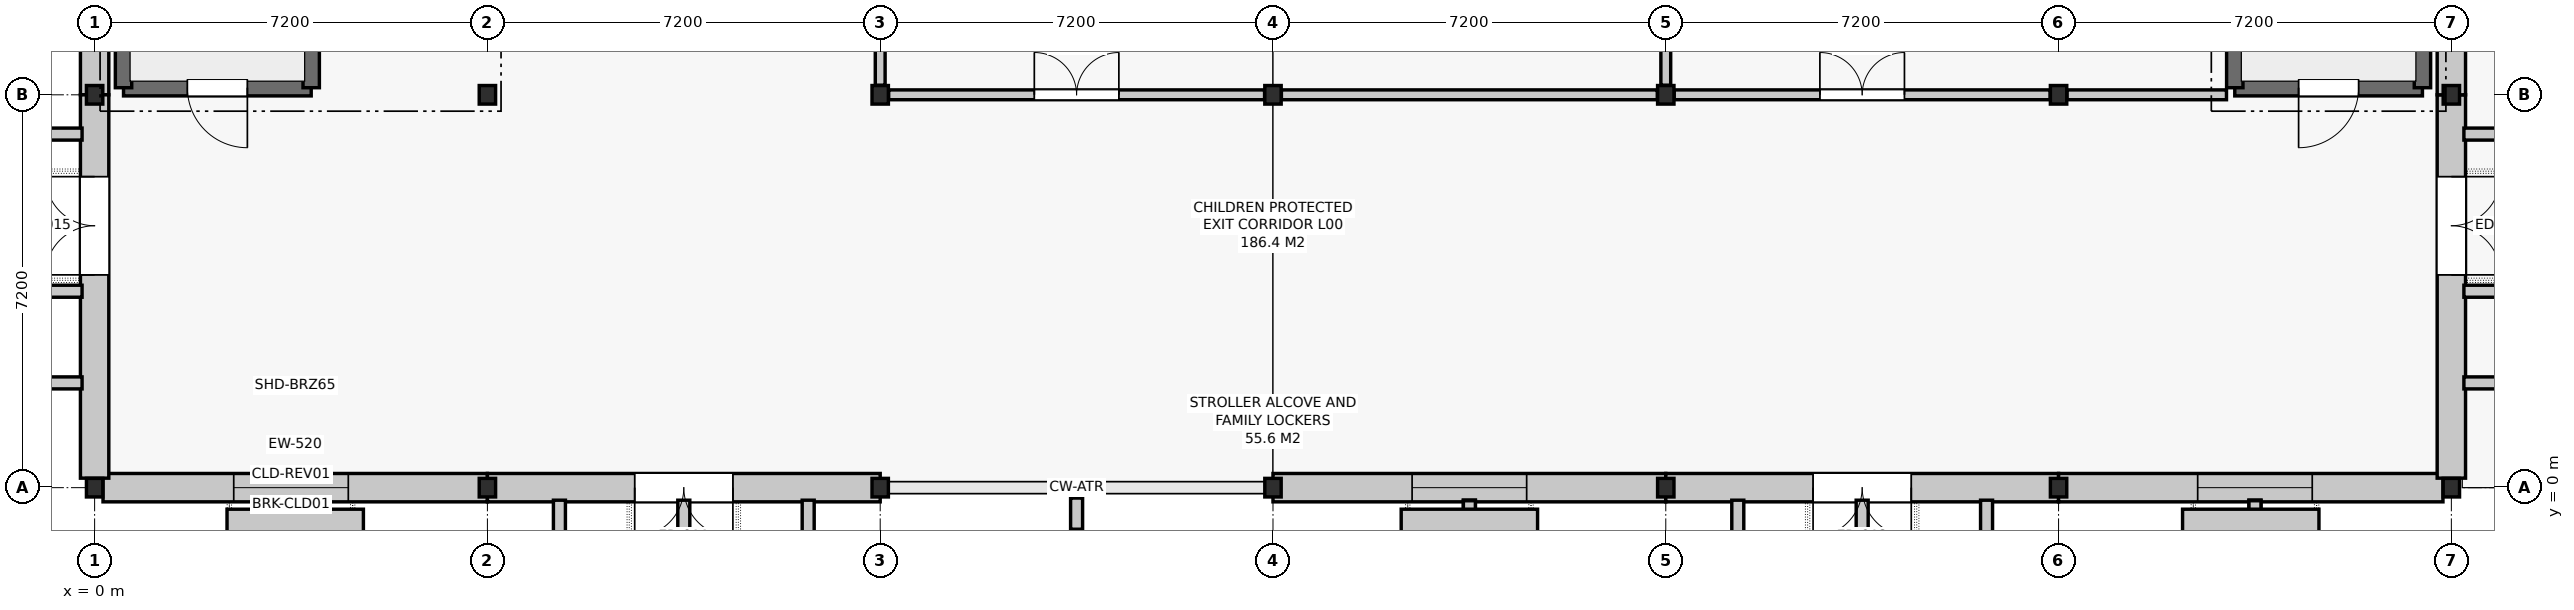
"""IFC4 building model, lengths in metres.
Left out: names, types, materials, properties, quantities, classifications, styles, units other than length and angle.
Written with IfcOpenShell. Run it as: python <this file> out.ifc"""

import sys

from ifc_helpers import new_model, si_unit, direction, frame, frame_2d, origin, origin_2d, place, context, subcontext, project, spatial, rectangle, i_section, extrude, element, fill, save


model = new_model("IFC4")
c1 = context("Model", 3, precision=1e-05, world=origin(), true_north=direction((0.0, 1.0)))
c2 = subcontext(c1, "Body", "Model", "MODEL_VIEW")
j1 = project(units=[si_unit("LENGTHUNIT", "METRE"), si_unit("PLANEANGLEUNIT", "RADIAN")], contexts=[c1])
p1 = place(None, origin())
s1 = spatial("IfcSite", under=j1, at=p1, CompositionType="ELEMENT")
p2 = place(p1, origin())
s2 = spatial("IfcBuilding", under=s1, at=p2, CompositionType="ELEMENT")
p3 = place(p2, origin())
s3 = spatial("IfcBuildingStorey", under=s2, at=p3, CompositionType="ELEMENT", Elevation=0.0)
for number, where, z_axis, x_axis in (
    (1, (0.0, 0.0, 0.0), (0.0, 0.0, 1.0), (1.0, 0.0, 0.0)),
    (2, (0.0, 7.2, 0.0), (0.0, 0.0, 1.0), (1.0, 0.0, 0.0)),
    (3, (7.2, 0.0, 0.0), (0.0, 0.0, 1.0), (1.0, 0.0, 0.0)),
    (4, (7.2, 7.2, 0.0), (0.0, 0.0, 1.0), (1.0, 0.0, 0.0)),
    (5, (14.4, 0.0, 0.0), (0.0, 0.0, 1.0), (1.0, 0.0, 0.0)),
    (6, (14.4, 7.2, 0.0), (0.0, 0.0, 1.0), (1.0, 0.0, 0.0)),
    (7, (21.6, 0.0, 0.0), (0.0, 0.0, 1.0), (1.0, 0.0, 0.0)),
    (8, (21.6, 7.2, 0.0), (0.0, 0.0, 1.0), (1.0, 0.0, 0.0)),
    (9, (28.8, 0.0, 0.0), (0.0, 0.0, 1.0), (1.0, 0.0, 0.0)),
    (10, (28.8, 7.2, 0.0), (0.0, 0.0, 1.0), (1.0, 0.0, 0.0)),
    (11, (36.0, 0.0, 0.0), (0.0, 0.0, 1.0), (1.0, 0.0, 0.0)),
    (12, (36.0, 7.2, 0.0), (0.0, 0.0, 1.0), (1.0, 0.0, 0.0)),
    (13, (43.2, 0.0, 0.0), (0.0, 0.0, 1.0), (1.0, 0.0, 0.0)),
    (14, (43.2, 7.2, 0.0), (0.0, 0.0, 1.0), (1.0, 0.0, 0.0)),
):
    element("IfcColumn", number, at=place(p3, frame(where, z_axis=z_axis, x_axis=x_axis)), inside=s3, PredefinedType="COLUMN", context=c2, shape_type="SweptSolid", body=[
        extrude(i_section(OverallWidth=0.3, OverallDepth=0.34, WebThickness=0.012, FlangeThickness=0.021, FilletRadius=0.027, at=origin_2d()), origin(), (0.0, 0.0, 1.0), 5.4),
    ])
p4 = place(p3, frame((0.154, 0.0, 0.0), z_axis=(0.0, 0.0, 1.0), x_axis=(1.0, 0.0, 0.0)))
e15 = element("IfcWall", 15, at=p4, inside=s3, PredefinedType="SOLIDWALL", context=c2, shape_type="SweptSolid", body=[
    extrude(rectangle(XDim=7.046, YDim=0.52, at=frame_2d((3.523, 0.0))), origin(), (0.0, 0.0, 1.0), 4.4),
])
p5 = place(p4, frame((2.396, 0.0, 0.9)))
e16 = element("IfcOpeningElement", 16, at=p5, cuts=e15, PredefinedType="OPENING", context=c2, shape_type="SweptSolid", body=[
    extrude(rectangle(XDim=2.1, YDim=2.1, at=frame_2d((1.05, 1.05))), frame((0.0, 0.272, 0.0), z_axis=(0.0, -1.0, 0.0), x_axis=(1.0, 0.0, 0.0)), (0.0, 0.0, 1.0), 0.544),
])
p6 = place(p3, frame((7.2, 0.0, 0.0), z_axis=(0.0, 0.0, 1.0), x_axis=(1.0, 0.0, 0.0)))
e17 = element("IfcWall", 17, at=p6, inside=s3, PredefinedType="SOLIDWALL", context=c2, shape_type="SweptSolid", body=[
    extrude(rectangle(XDim=7.2, YDim=0.52, at=frame_2d((3.6, 0.0))), origin(), (0.0, 0.0, 1.0), 4.4),
])
p7 = place(p6, frame((2.7, 0.0, 0.0)))
e18 = element("IfcOpeningElement", 18, at=p7, cuts=e17, PredefinedType="OPENING", context=c2, shape_type="SweptSolid", body=[
    extrude(rectangle(XDim=1.8, YDim=2.2, at=frame_2d((0.9, 1.1))), frame((0.0, 0.272, 0.0), z_axis=(0.0, -1.0, 0.0), x_axis=(1.0, 0.0, 0.0)), (0.0, 0.0, 1.0), 0.544),
])
p8 = place(p3, frame((21.6, 0.0, 0.0), z_axis=(0.0, 0.0, 1.0), x_axis=(1.0, 0.0, 0.0)))
e19 = element("IfcWall", 19, at=p8, inside=s3, PredefinedType="SOLIDWALL", context=c2, shape_type="SweptSolid", body=[
    extrude(rectangle(XDim=7.2, YDim=0.52, at=frame_2d((3.6, 0.0))), origin(), (0.0, 0.0, 1.0), 4.4),
])
p9 = place(p8, frame((2.55, 0.0, 0.9)))
e20 = element("IfcOpeningElement", 20, at=p9, cuts=e19, PredefinedType="OPENING", context=c2, shape_type="SweptSolid", body=[
    extrude(rectangle(XDim=2.1, YDim=2.1, at=frame_2d((1.05, 1.05))), frame((0.0, 0.272, 0.0), z_axis=(0.0, -1.0, 0.0), x_axis=(1.0, 0.0, 0.0)), (0.0, 0.0, 1.0), 0.544),
])
p10 = place(p3, frame((28.8, 0.0, 0.0), z_axis=(0.0, 0.0, 1.0), x_axis=(1.0, 0.0, 0.0)))
e21 = element("IfcWall", 21, at=p10, inside=s3, PredefinedType="SOLIDWALL", context=c2, shape_type="SweptSolid", body=[
    extrude(rectangle(XDim=7.2, YDim=0.52, at=frame_2d((3.6, 0.0))), origin(), (0.0, 0.0, 1.0), 4.4),
])
p11 = place(p10, frame((2.7, 0.0, 0.0)))
e22 = element("IfcOpeningElement", 22, at=p11, cuts=e21, PredefinedType="OPENING", context=c2, shape_type="SweptSolid", body=[
    extrude(rectangle(XDim=1.8, YDim=2.2, at=frame_2d((0.9, 1.1))), frame((0.0, 0.272, 0.0), z_axis=(0.0, -1.0, 0.0), x_axis=(1.0, 0.0, 0.0)), (0.0, 0.0, 1.0), 0.544),
])
p12 = place(p3, frame((36.0, 0.0, 0.0), z_axis=(0.0, 0.0, 1.0), x_axis=(1.0, 0.0, 0.0)))
e23 = element("IfcWall", 23, at=p12, inside=s3, PredefinedType="SOLIDWALL", context=c2, shape_type="SweptSolid", body=[
    extrude(rectangle(XDim=7.046, YDim=0.52, at=frame_2d((3.523, 0.0))), origin(), (0.0, 0.0, 1.0), 4.4),
])
p13 = place(p12, frame((2.55, 0.0, 0.9)))
e24 = element("IfcOpeningElement", 24, at=p13, cuts=e23, PredefinedType="OPENING", context=c2, shape_type="SweptSolid", body=[
    extrude(rectangle(XDim=2.1, YDim=2.1, at=frame_2d((1.05, 1.05))), frame((0.0, 0.272, 0.0), z_axis=(0.0, -1.0, 0.0), x_axis=(1.0, 0.0, 0.0)), (0.0, 0.0, 1.0), 0.544),
])
p14 = place(p3, frame((43.2, 0.174, 0.0), z_axis=(0.0, 0.0, 1.0), x_axis=(0.0, 1.0, 0.0)))
e25 = element("IfcWall", 25, at=p14, inside=s3, PredefinedType="SOLIDWALL", context=c2, shape_type="SweptSolid", body=[
    extrude(rectangle(XDim=7.026, YDim=0.52, at=frame_2d((3.513, 0.0))), origin(), (0.0, 0.0, 1.0), 4.4),
])
p15 = place(p14, frame((3.726, 0.0, 0.0)))
e26 = element("IfcOpeningElement", 26, at=p15, cuts=e25, PredefinedType="OPENING", context=c2, shape_type="SweptSolid", body=[
    extrude(rectangle(XDim=1.8, YDim=2.2, at=frame_2d((0.9, 1.1))), frame((0.0, 0.272, 0.0), z_axis=(0.0, -1.0, 0.0), x_axis=(1.0, 0.0, 0.0)), (0.0, 0.0, 1.0), 0.544),
])
p16 = place(p3, frame((43.2, 7.2, 0.0), z_axis=(0.0, 0.0, 1.0), x_axis=(0.0, 1.0, 0.0)))
e27 = element("IfcWall", 27, at=p16, inside=s3, PredefinedType="SOLIDWALL", context=c2, shape_type="SweptSolid", body=[
    extrude(rectangle(XDim=7.2, YDim=0.52, at=frame_2d((3.6, 0.0))), origin(), (0.0, 0.0, 1.0), 4.4),
])
p17 = place(p16, frame((2.55, 0.0, 0.9)))
e28 = element("IfcOpeningElement", 28, at=p17, cuts=e27, PredefinedType="OPENING", context=c2, shape_type="SweptSolid", body=[
    extrude(rectangle(XDim=2.1, YDim=2.1, at=frame_2d((1.05, 1.05))), frame((0.0, 0.272, 0.0), z_axis=(0.0, -1.0, 0.0), x_axis=(1.0, 0.0, 0.0)), (0.0, 0.0, 1.0), 0.544),
])
p18 = place(p3, frame((0.0, 14.4, 0.0), z_axis=(0.0, 0.0, 1.0), x_axis=(0.0, -1.0, 0.0)))
e29 = element("IfcWall", 29, at=p18, inside=s3, PredefinedType="SOLIDWALL", context=c2, shape_type="SweptSolid", body=[
    extrude(rectangle(XDim=7.2, YDim=0.52, at=frame_2d((3.6, 0.0))), origin(), (0.0, 0.0, 1.0), 4.4),
])
p19 = place(p18, frame((2.55, 0.0, 0.9)))
e30 = element("IfcOpeningElement", 30, at=p19, cuts=e29, PredefinedType="OPENING", context=c2, shape_type="SweptSolid", body=[
    extrude(rectangle(XDim=2.1, YDim=2.1, at=frame_2d((1.05, 1.05))), frame((0.0, 0.272, 0.0), z_axis=(0.0, -1.0, 0.0), x_axis=(1.0, 0.0, 0.0)), (0.0, 0.0, 1.0), 0.544),
])
p20 = place(p3, frame((0.0, 7.2, 0.0), z_axis=(0.0, 0.0, 1.0), x_axis=(0.0, -1.0, 0.0)))
e31 = element("IfcWall", 31, at=p20, inside=s3, PredefinedType="SOLIDWALL", context=c2, shape_type="SweptSolid", body=[
    extrude(rectangle(XDim=7.026, YDim=0.52, at=frame_2d((3.513, 0.0))), origin(), (0.0, 0.0, 1.0), 4.4),
])
p21 = place(p20, frame((1.5, 0.0, 0.0)))
e32 = element("IfcOpeningElement", 32, at=p21, cuts=e31, PredefinedType="OPENING", context=c2, shape_type="SweptSolid", body=[
    extrude(rectangle(XDim=1.8, YDim=2.2, at=frame_2d((0.9, 1.1))), frame((0.0, 0.272, 0.0), z_axis=(0.0, -1.0, 0.0), x_axis=(1.0, 0.0, 0.0)), (0.0, 0.0, 1.0), 0.544),
])
p22 = place(p3, frame((0.53, 7.33, 0.0), z_axis=(0.0, 0.0, 1.0), x_axis=(1.0, 0.0, 0.0)))
e33 = element("IfcWall", 33, at=p22, inside=s3, PredefinedType="SHEAR", context=c2, shape_type="SweptSolid", body=[
    extrude(rectangle(XDim=3.44, YDim=0.3, at=frame_2d((1.72, 0.0))), origin(), (0.0, 0.0, 1.0), 5.12),
])
p23 = place(p22, frame((1.17, 0.0, 0.0)))
e34 = element("IfcOpeningElement", 34, at=p23, cuts=e33, PredefinedType="OPENING", context=c2, shape_type="SweptSolid", body=[
    extrude(rectangle(XDim=1.1, YDim=2.15, at=frame_2d((0.55, 1.075))), frame((0.0, 0.162, 0.0), z_axis=(0.0, -1.0, 0.0), x_axis=(1.0, 0.0, 0.0)), (0.0, 0.0, 1.0), 0.324),
])
for number, where, z_axis, x_axis in (
    (35, (3.97, 7.33, 0.0), (0.0, 0.0, 1.0), (0.0, 1.0, 0.0)),
    (36, (0.53, 14.27, 0.0), (0.0, 0.0, 1.0), (0.0, -1.0, 0.0)),
):
    element("IfcWall", number, at=place(p3, frame(where, z_axis=z_axis, x_axis=x_axis)), inside=s3, PredefinedType="SHEAR", context=c2, shape_type="SweptSolid", body=[
        extrude(rectangle(XDim=6.94, YDim=0.3, at=frame_2d((3.47, 0.0))), origin(), (0.0, 0.0, 1.0), 5.12),
    ])
p24 = place(p3, frame((39.23, 7.33, 0.0), z_axis=(0.0, 0.0, 1.0), x_axis=(1.0, 0.0, 0.0)))
e37 = element("IfcWall", 37, at=p24, inside=s3, PredefinedType="SHEAR", context=c2, shape_type="SweptSolid", body=[
    extrude(rectangle(XDim=3.44, YDim=0.3, at=frame_2d((1.72, 0.0))), origin(), (0.0, 0.0, 1.0), 5.12),
])
p25 = place(p24, frame((1.17, 0.0, 0.0)))
e38 = element("IfcOpeningElement", 38, at=p25, cuts=e37, PredefinedType="OPENING", context=c2, shape_type="SweptSolid", body=[
    extrude(rectangle(XDim=1.1, YDim=2.15, at=frame_2d((0.55, 1.075))), frame((0.0, 0.162, 0.0), z_axis=(0.0, -1.0, 0.0), x_axis=(1.0, 0.0, 0.0)), (0.0, 0.0, 1.0), 0.324),
])
for number, where, z_axis, x_axis in (
    (39, (42.67, 7.33, 0.0), (0.0, 0.0, 1.0), (0.0, 1.0, 0.0)),
    (40, (39.23, 14.27, 0.0), (0.0, 0.0, 1.0), (0.0, -1.0, 0.0)),
):
    element("IfcWall", number, at=place(p3, frame(where, z_axis=z_axis, x_axis=x_axis)), inside=s3, PredefinedType="SHEAR", context=c2, shape_type="SweptSolid", body=[
        extrude(rectangle(XDim=6.94, YDim=0.3, at=frame_2d((3.47, 0.0))), origin(), (0.0, 0.0, 1.0), 5.12),
    ])
p26 = place(p3, frame((14.554, 7.2, 0.0), z_axis=(0.0, 0.0, 1.0), x_axis=(1.0, 0.0, 0.0)))
e41 = element("IfcWall", 41, at=p26, inside=s3, PredefinedType="PARTITIONING", context=c2, shape_type="SweptSolid", body=[
    extrude(rectangle(XDim=6.892, YDim=0.18, at=frame_2d((3.446, 0.0))), origin(), (0.0, 0.0, 1.0), 4.765),
])
p27 = place(p26, frame((2.671, 0.0, 0.0)))
e42 = element("IfcOpeningElement", 42, at=p27, cuts=e41, PredefinedType="OPENING", context=c2, shape_type="SweptSolid", body=[
    extrude(rectangle(XDim=1.55, YDim=2.2, at=frame_2d((0.775, 1.1))), frame((0.0, 0.102, 0.0), z_axis=(0.0, -1.0, 0.0), x_axis=(1.0, 0.0, 0.0)), (0.0, 0.0, 1.0), 0.204),
])
p28 = place(p3, frame((21.754, 7.2, 0.0), z_axis=(0.0, 0.0, 1.0), x_axis=(1.0, 0.0, 0.0)))
e43 = element("IfcWall", 43, at=p28, inside=s3, PredefinedType="PARTITIONING", context=c2, shape_type="SweptSolid", body=[
    extrude(rectangle(XDim=6.892, YDim=0.18, at=frame_2d((3.446, 0.0))), origin(), (0.0, 0.0, 1.0), 4.765),
])
p29 = place(p3, frame((28.954, 7.2, 0.0), z_axis=(0.0, 0.0, 1.0), x_axis=(1.0, 0.0, 0.0)))
e44 = element("IfcWall", 44, at=p29, inside=s3, PredefinedType="PARTITIONING", context=c2, shape_type="SweptSolid", body=[
    extrude(rectangle(XDim=6.892, YDim=0.18, at=frame_2d((3.446, 0.0))), origin(), (0.0, 0.0, 1.0), 4.765),
])
p30 = place(p29, frame((2.671, 0.0, 0.0)))
e45 = element("IfcOpeningElement", 45, at=p30, cuts=e44, PredefinedType="OPENING", context=c2, shape_type="SweptSolid", body=[
    extrude(rectangle(XDim=1.55, YDim=2.2, at=frame_2d((0.775, 1.1))), frame((0.0, 0.102, 0.0), z_axis=(0.0, -1.0, 0.0), x_axis=(1.0, 0.0, 0.0)), (0.0, 0.0, 1.0), 0.204),
])
p31 = place(p3, frame((36.154, 7.2, 0.0), z_axis=(0.0, 0.0, 1.0), x_axis=(1.0, 0.0, 0.0)))
e46 = element("IfcWall", 46, at=p31, inside=s3, PredefinedType="PARTITIONING", context=c2, shape_type="SweptSolid", body=[
    extrude(rectangle(XDim=2.924, YDim=0.18, at=frame_2d((1.462, 0.0))), origin(), (0.0, 0.0, 1.0), 4.765),
])
p32 = place(p3, frame((14.4, 7.374, 0.0), z_axis=(0.0, 0.0, 1.0), x_axis=(0.0, 1.0, 0.0)))
e47 = element("IfcWall", 47, at=p32, inside=s3, PredefinedType="PARTITIONING", context=c2, shape_type="SweptSolid", body=[
    extrude(rectangle(XDim=6.852, YDim=0.18, at=frame_2d((3.426, 0.0))), origin(), (0.0, 0.0, 1.0), 5.105),
])
p33 = place(p3, frame((28.8, 7.374, 0.0), z_axis=(0.0, 0.0, 1.0), x_axis=(0.0, 1.0, 0.0)))
e48 = element("IfcWall", 48, at=p33, inside=s3, PredefinedType="PARTITIONING", context=c2, shape_type="SweptSolid", body=[
    extrude(rectangle(XDim=6.852, YDim=0.18, at=frame_2d((3.426, 0.0))), origin(), (0.0, 0.0, 1.0), 4.665),
])
p34 = place(p5, origin())
e49 = element("IfcWindow", 49, at=p34, inside=s3, PartitioningType="SINGLE_PANEL", PredefinedType="WINDOW", context=c2, shape_type="SweptSolid", body=[
    extrude(rectangle(XDim=2.1, YDim=2.1, at=frame_2d((1.05, 1.05))), frame((0.0, 0.03, 0.0), z_axis=(0.0, -1.0, 0.0), x_axis=(1.0, 0.0, 0.0)), (0.0, 0.0, 1.0), 0.06),
])
fill(e16, e49)
p35 = place(p7, frame((1.8, 0.0, 0.0), z_axis=(0.0, 0.0, 1.0), x_axis=(-1.0, 0.0, 0.0)))
e50 = element("IfcDoor", 50, at=p35, inside=s3, OperationType="DOUBLE_DOOR_SINGLE_SWING", PredefinedType="DOOR", context=c2, shape_type="SweptSolid", body=[
    extrude(rectangle(XDim=1.8, YDim=2.2, at=frame_2d((0.9, 1.1))), frame((0.0, 0.025, 0.0), z_axis=(0.0, -1.0, 0.0), x_axis=(1.0, 0.0, 0.0)), (0.0, 0.0, 1.0), 0.05),
])
fill(e18, e50)
p36 = place(p9, origin())
e51 = element("IfcWindow", 51, at=p36, inside=s3, PartitioningType="SINGLE_PANEL", PredefinedType="WINDOW", context=c2, shape_type="SweptSolid", body=[
    extrude(rectangle(XDim=2.1, YDim=2.1, at=frame_2d((1.05, 1.05))), frame((0.0, 0.03, 0.0), z_axis=(0.0, -1.0, 0.0), x_axis=(1.0, 0.0, 0.0)), (0.0, 0.0, 1.0), 0.06),
])
fill(e20, e51)
p37 = place(p11, frame((1.8, 0.0, 0.0), z_axis=(0.0, 0.0, 1.0), x_axis=(-1.0, 0.0, 0.0)))
e52 = element("IfcDoor", 52, at=p37, inside=s3, OperationType="DOUBLE_DOOR_SINGLE_SWING", PredefinedType="DOOR", context=c2, shape_type="SweptSolid", body=[
    extrude(rectangle(XDim=1.8, YDim=2.2, at=frame_2d((0.9, 1.1))), frame((0.0, 0.025, 0.0), z_axis=(0.0, -1.0, 0.0), x_axis=(1.0, 0.0, 0.0)), (0.0, 0.0, 1.0), 0.05),
])
fill(e22, e52)
p38 = place(p13, origin())
e53 = element("IfcWindow", 53, at=p38, inside=s3, PartitioningType="SINGLE_PANEL", PredefinedType="WINDOW", context=c2, shape_type="SweptSolid", body=[
    extrude(rectangle(XDim=2.1, YDim=2.1, at=frame_2d((1.05, 1.05))), frame((0.0, 0.03, 0.0), z_axis=(0.0, -1.0, 0.0), x_axis=(1.0, 0.0, 0.0)), (0.0, 0.0, 1.0), 0.06),
])
fill(e24, e53)
p39 = place(p15, frame((1.8, 0.0, 0.0), z_axis=(0.0, 0.0, 1.0), x_axis=(-1.0, 0.0, 0.0)))
e54 = element("IfcDoor", 54, at=p39, inside=s3, OperationType="DOUBLE_DOOR_SINGLE_SWING", PredefinedType="DOOR", context=c2, shape_type="SweptSolid", body=[
    extrude(rectangle(XDim=1.8, YDim=2.2, at=frame_2d((0.9, 1.1))), frame((0.0, 0.025, 0.0), z_axis=(0.0, -1.0, 0.0), x_axis=(1.0, 0.0, 0.0)), (0.0, 0.0, 1.0), 0.05),
])
fill(e26, e54)
p40 = place(p21, frame((1.8, 0.0, 0.0), z_axis=(0.0, 0.0, 1.0), x_axis=(-1.0, 0.0, 0.0)))
e55 = element("IfcDoor", 55, at=p40, inside=s3, OperationType="DOUBLE_DOOR_SINGLE_SWING", PredefinedType="DOOR", context=c2, shape_type="SweptSolid", body=[
    extrude(rectangle(XDim=1.8, YDim=2.2, at=frame_2d((0.9, 1.1))), frame((0.0, 0.025, 0.0), z_axis=(0.0, -1.0, 0.0), x_axis=(1.0, 0.0, 0.0)), (0.0, 0.0, 1.0), 0.05),
])
fill(e32, e55)
p41 = place(p23, frame((1.1, 0.0, 0.0), z_axis=(0.0, 0.0, 1.0), x_axis=(-1.0, 0.0, 0.0)))
e56 = element("IfcDoor", 56, at=p41, inside=s3, OperationType="SINGLE_SWING_LEFT", PredefinedType="DOOR", context=c2, shape_type="SweptSolid", body=[
    extrude(rectangle(XDim=1.1, YDim=2.15, at=frame_2d((0.55, 1.075))), frame((0.0, 0.025, 0.0), z_axis=(0.0, -1.0, 0.0), x_axis=(1.0, 0.0, 0.0)), (0.0, 0.0, 1.0), 0.05),
])
fill(e34, e56)
p42 = place(p25, frame((1.1, 0.0, 0.0), z_axis=(0.0, 0.0, 1.0), x_axis=(-1.0, 0.0, 0.0)))
e57 = element("IfcDoor", 57, at=p42, inside=s3, OperationType="SINGLE_SWING_RIGHT", PredefinedType="DOOR", context=c2, shape_type="SweptSolid", body=[
    extrude(rectangle(XDim=1.1, YDim=2.15, at=frame_2d((0.55, 1.075))), frame((0.0, 0.025, 0.0), z_axis=(0.0, -1.0, 0.0), x_axis=(1.0, 0.0, 0.0)), (0.0, 0.0, 1.0), 0.05),
])
fill(e38, e57)
p43 = place(p27, origin())
e58 = element("IfcDoor", 58, at=p43, inside=s3, OperationType="DOUBLE_DOOR_SINGLE_SWING", PredefinedType="DOOR", context=c2, shape_type="SweptSolid", body=[
    extrude(rectangle(XDim=1.55, YDim=2.2, at=frame_2d((0.775, 1.1))), frame((0.0, 0.025, 0.0), z_axis=(0.0, -1.0, 0.0), x_axis=(1.0, 0.0, 0.0)), (0.0, 0.0, 1.0), 0.05),
])
fill(e42, e58)
p44 = place(p30, origin())
e59 = element("IfcDoor", 59, at=p44, inside=s3, OperationType="DOUBLE_DOOR_SINGLE_SWING", PredefinedType="DOOR", context=c2, shape_type="SweptSolid", body=[
    extrude(rectangle(XDim=1.55, YDim=2.2, at=frame_2d((0.775, 1.1))), frame((0.0, 0.025, 0.0), z_axis=(0.0, -1.0, 0.0), x_axis=(1.0, 0.0, 0.0)), (0.0, 0.0, 1.0), 0.05),
])
fill(e45, e59)
save(model, sys.argv[1])
